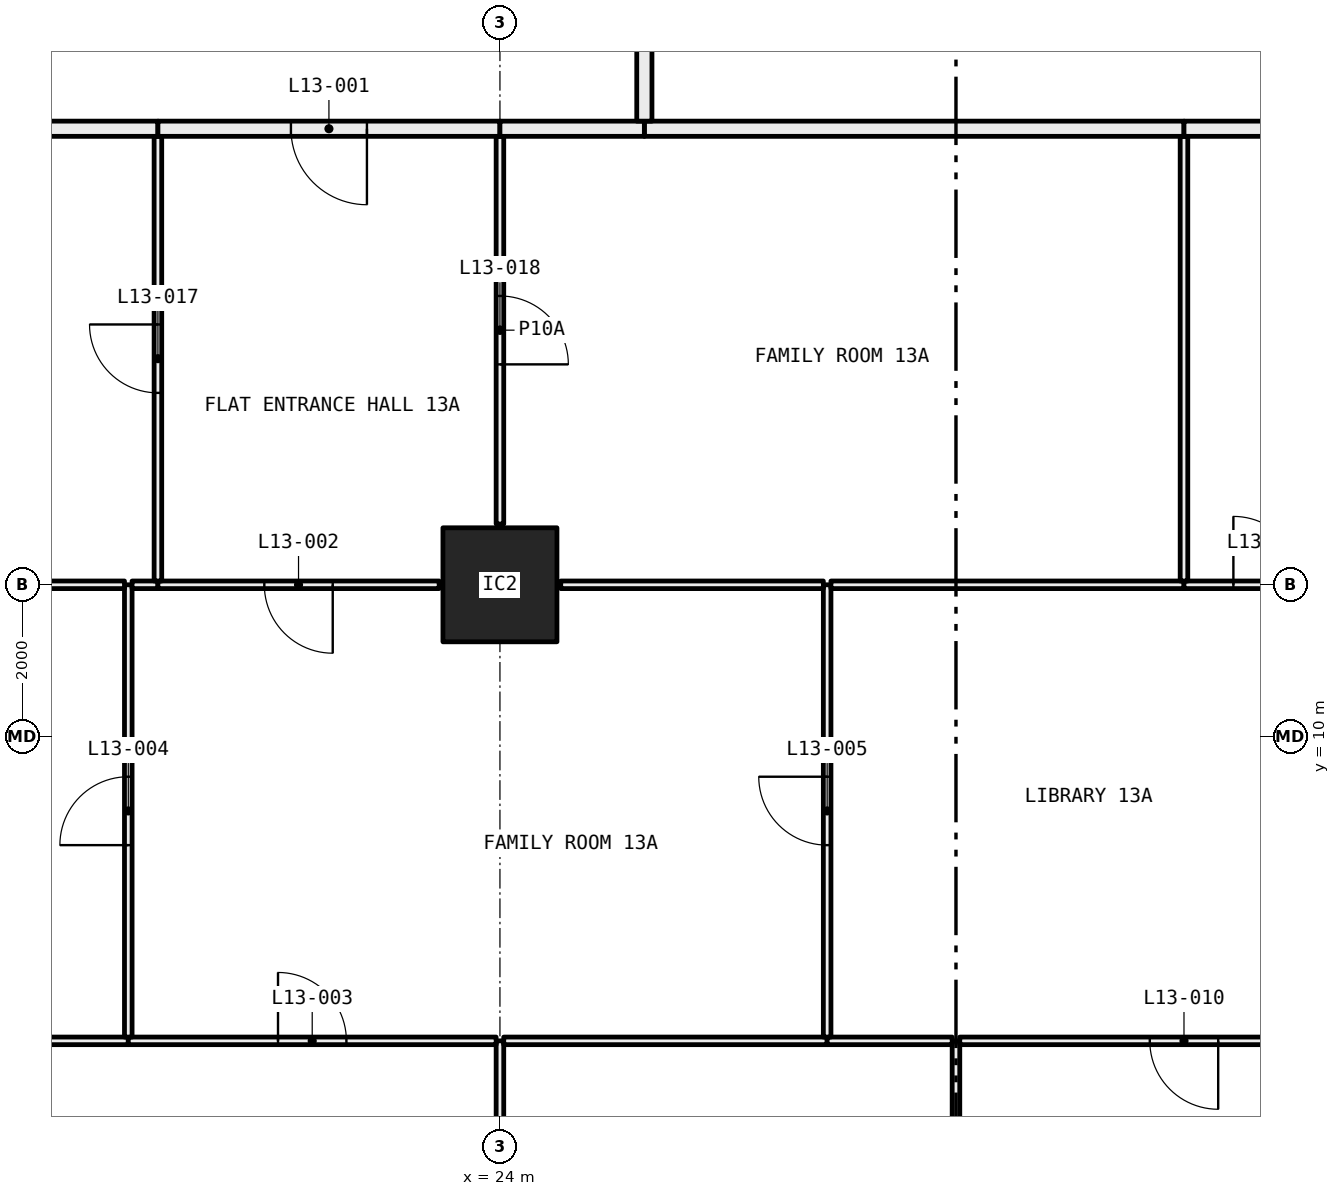
"""IFC4 building model, lengths in metres.
Left out: names, types, materials, properties, quantities, classifications, styles, units other than length and angle.
Written with IfcOpenShell. Run it as: python <this file> out.ifc"""

import sys

from ifc_helpers import new_model, si_unit, direction, frame, frame_2d, origin, origin_2d, place, context, subcontext, project, spatial, rectangle, hollow_rectangle, extrude, element, fill, save


model = new_model("IFC4")
c1 = context("Model", 3, precision=1e-05, world=origin(), true_north=direction((0.0, 1.0)))
c2 = subcontext(c1, "Body", "Model", "MODEL_VIEW")
j1 = project(units=[si_unit("LENGTHUNIT", "METRE"), si_unit("PLANEANGLEUNIT", "RADIAN")], contexts=[c1])
p1 = place(None, origin())
s1 = spatial("IfcSite", under=j1, at=p1, CompositionType="ELEMENT")
p2 = place(p1, origin())
s2 = spatial("IfcBuilding", under=s1, at=p2, CompositionType="ELEMENT")
p3 = place(p2, frame((0.0, 0.0, 57.6)))
s3 = spatial("IfcBuildingStorey", under=s2, at=p3, CompositionType="ELEMENT", Elevation=57.6)
p4 = place(p3, frame((24.0, 12.0, 0.0), z_axis=(0.0, 0.0, 1.0), x_axis=(1.0, 0.0, 0.0)))
e1 = element("IfcColumn", 1, at=p4, inside=s3, PredefinedType="COLUMN", context=c2, shape_type="SweptSolid", body=[
    extrude(hollow_rectangle(XDim=1.5, YDim=1.5, WallThickness=0.065, at=origin_2d()), origin(), (0.0, 0.0, 1.0), 3.05),
])
p5 = place(p3, frame((24.0, 0.72, 0.0), z_axis=(0.0, 0.0, 1.0), x_axis=(0.0, 1.0, 0.0)))
e2 = element("IfcWall", 2, at=p5, inside=s3, PredefinedType="PARTITIONING", context=c2, shape_type="SweptSolid", body=[
    extrude(rectangle(XDim=5.28, YDim=0.1, at=frame_2d((2.64, 0.0))), origin(), (0.0, 0.0, 1.0), 2.45),
])
p6 = place(p5, frame((2.19, 0.0, 0.0)))
e3 = element("IfcOpeningElement", 3, at=p6, cuts=e2, PredefinedType="OPENING", context=c2, shape_type="SweptSolid", body=[
    extrude(rectangle(XDim=0.9, YDim=2.1, at=frame_2d((0.45, 1.05))), frame((0.0, 0.06, 0.0), z_axis=(0.0, -1.0, 0.0), x_axis=(1.0, 0.0, 0.0)), (0.0, 0.0, 1.0), 0.12),
])
p7 = place(p3, frame((19.11, 6.0, 0.0), z_axis=(0.0, 0.0, 1.0), x_axis=(-1.0, 0.0, 0.0)))
e4 = element("IfcWall", 4, at=p7, inside=s3, PredefinedType="PARTITIONING", context=c2, shape_type="SweptSolid", body=[
    extrude(rectangle(XDim=7.06, YDim=0.1, at=frame_2d((3.53, 0.0))), origin(), (0.0, 0.0, 1.0), 2.45),
])
p8 = place(p3, frame((23.95, 6.0, 0.0), z_axis=(0.0, 0.0, 1.0), x_axis=(-1.0, 0.0, 0.0)))
e5 = element("IfcWall", 5, at=p8, inside=s3, PredefinedType="PARTITIONING", context=c2, shape_type="SweptSolid", body=[
    extrude(rectangle(XDim=4.84, YDim=0.1, at=frame_2d((2.42, 0.0))), origin(), (0.0, 0.0, 1.0), 2.45),
])
p9 = place(p8, frame((1.97, 0.0, 0.0)))
e6 = element("IfcOpeningElement", 6, at=p9, cuts=e5, PredefinedType="OPENING", context=c2, shape_type="SweptSolid", body=[
    extrude(rectangle(XDim=0.9, YDim=2.1, at=frame_2d((0.45, 1.05))), frame((0.0, 0.06, 0.0), z_axis=(0.0, -1.0, 0.0), x_axis=(1.0, 0.0, 0.0)), (0.0, 0.0, 1.0), 0.12),
])
p10 = place(p3, frame((30.0, 0.72, 0.0), z_axis=(0.0, 0.0, 1.0), x_axis=(0.0, 1.0, 0.0)))
e7 = element("IfcWall", 7, at=p10, inside=s3, PredefinedType="PARTITIONING", context=c2, shape_type="SweptSolid", body=[
    extrude(rectangle(XDim=5.28, YDim=0.1, at=frame_2d((2.64, 0.0))), origin(), (0.0, 0.0, 1.0), 3.05),
])
p11 = place(p3, frame((28.305, 6.0, 0.0), z_axis=(0.0, 0.0, 1.0), x_axis=(-1.0, 0.0, 0.0)))
e8 = element("IfcWall", 8, at=p11, inside=s3, PredefinedType="PARTITIONING", context=c2, shape_type="SweptSolid", body=[
    extrude(rectangle(XDim=4.255, YDim=0.1, at=frame_2d((2.127, 0.0))), origin(), (0.0, 0.0, 1.0), 2.45),
])
p12 = place(p3, frame((29.95, 6.0, 0.0), z_axis=(0.0, 0.0, 1.0), x_axis=(-1.0, 0.0, 0.0)))
e9 = element("IfcWall", 9, at=p12, inside=s3, PredefinedType="PARTITIONING", context=c2, shape_type="SweptSolid", body=[
    extrude(rectangle(XDim=1.645, YDim=0.1, at=frame_2d((0.823, 0.0))), origin(), (0.0, 0.0, 1.0), 3.05),
])
p13 = place(p3, frame((35.95, 6.0, 0.0), z_axis=(0.0, 0.0, 1.0), x_axis=(-1.0, 0.0, 0.0)))
e10 = element("IfcWall", 10, at=p13, inside=s3, PredefinedType="PARTITIONING", context=c2, shape_type="SweptSolid", body=[
    extrude(rectangle(XDim=5.9, YDim=0.1, at=frame_2d((2.95, 0.0))), origin(), (0.0, 0.0, 1.0), 2.45),
])
p14 = place(p13, frame((2.5, 0.0, 0.0)))
e11 = element("IfcOpeningElement", 11, at=p14, cuts=e10, PredefinedType="OPENING", context=c2, shape_type="SweptSolid", body=[
    extrude(rectangle(XDim=0.9, YDim=2.1, at=frame_2d((0.45, 1.05))), frame((0.0, 0.06, 0.0), z_axis=(0.0, -1.0, 0.0), x_axis=(1.0, 0.0, 0.0)), (0.0, 0.0, 1.0), 0.12),
])
p15 = place(p3, frame((19.11, 6.05, 0.0), z_axis=(0.0, 0.0, 1.0), x_axis=(0.0, 1.0, 0.0)))
e12 = element("IfcWall", 12, at=p15, inside=s3, PredefinedType="PARTITIONING", context=c2, shape_type="SweptSolid", body=[
    extrude(rectangle(XDim=5.95, YDim=0.1, at=frame_2d((2.975, 0.0))), origin(), (0.0, 0.0, 1.0), 2.45),
])
p16 = place(p15, frame((2.525, 0.0, 0.0)))
e13 = element("IfcOpeningElement", 13, at=p16, cuts=e12, PredefinedType="OPENING", context=c2, shape_type="SweptSolid", body=[
    extrude(rectangle(XDim=0.9, YDim=2.1, at=frame_2d((0.45, 1.05))), frame((0.0, 0.06, 0.0), z_axis=(0.0, -1.0, 0.0), x_axis=(1.0, 0.0, 0.0)), (0.0, 0.0, 1.0), 0.12),
])
p17 = place(p3, frame((19.06, 12.0, 0.0), z_axis=(0.0, 0.0, 1.0), x_axis=(-1.0, 0.0, 0.0)))
e14 = element("IfcWall", 14, at=p17, inside=s3, PredefinedType="PARTITIONING", context=c2, shape_type="SweptSolid", body=[
    extrude(rectangle(XDim=4.621, YDim=0.1, at=frame_2d((2.311, 0.0))), origin(), (0.0, 0.0, 1.0), 2.45),
])
p18 = place(p3, frame((28.305, 6.05, 0.0), z_axis=(0.0, 0.0, 1.0), x_axis=(0.0, 1.0, 0.0)))
e15 = element("IfcWall", 15, at=p18, inside=s3, PredefinedType="PARTITIONING", context=c2, shape_type="SweptSolid", body=[
    extrude(rectangle(XDim=5.95, YDim=0.1, at=frame_2d((2.975, 0.0))), origin(), (0.0, 0.0, 1.0), 2.45),
])
p19 = place(p18, frame((2.525, 0.0, 0.0)))
e16 = element("IfcOpeningElement", 16, at=p19, cuts=e15, PredefinedType="OPENING", context=c2, shape_type="SweptSolid", body=[
    extrude(rectangle(XDim=0.9, YDim=2.1, at=frame_2d((0.45, 1.05))), frame((0.0, 0.06, 0.0), z_axis=(0.0, -1.0, 0.0), x_axis=(1.0, 0.0, 0.0)), (0.0, 0.0, 1.0), 0.12),
])
p20 = place(p3, frame((19.5, 12.0, 0.0), z_axis=(0.0, 0.0, 1.0), x_axis=(-1.0, 0.0, 0.0)))
e17 = element("IfcWall", 17, at=p20, inside=s3, PredefinedType="PARTITIONING", context=c2, shape_type="SweptSolid", body=[
    extrude(rectangle(XDim=0.34, YDim=0.1, at=frame_2d((0.17, 0.0))), origin(), (0.0, 0.0, 1.0), 2.45),
])
p21 = place(p3, frame((23.2, 12.0, 0.0), z_axis=(0.0, 0.0, 1.0), x_axis=(-1.0, 0.0, 0.0)))
e18 = element("IfcWall", 18, at=p21, inside=s3, PredefinedType="PARTITIONING", context=c2, shape_type="SweptSolid", body=[
    extrude(rectangle(XDim=3.7, YDim=0.1, at=frame_2d((1.85, 0.0))), origin(), (0.0, 0.0, 1.0), 2.45),
])
p22 = place(p21, frame((1.4, 0.0, 0.0)))
e19 = element("IfcOpeningElement", 19, at=p22, cuts=e18, PredefinedType="OPENING", context=c2, shape_type="SweptSolid", body=[
    extrude(rectangle(XDim=0.9, YDim=2.1, at=frame_2d((0.45, 1.05))), frame((0.0, 0.06, 0.0), z_axis=(0.0, -1.0, 0.0), x_axis=(1.0, 0.0, 0.0)), (0.0, 0.0, 1.0), 0.12),
])
p23 = place(p3, frame((28.255, 12.0, 0.0), z_axis=(0.0, 0.0, 1.0), x_axis=(-1.0, 0.0, 0.0)))
e20 = element("IfcWall", 20, at=p23, inside=s3, PredefinedType="PARTITIONING", context=c2, shape_type="SweptSolid", body=[
    extrude(rectangle(XDim=3.455, YDim=0.1, at=frame_2d((1.728, 0.0))), origin(), (0.0, 0.0, 1.0), 2.45),
])
p24 = place(p3, frame((33.0, 12.0, 0.0), z_axis=(0.0, 0.0, 1.0), x_axis=(-1.0, 0.0, 0.0)))
e21 = element("IfcWall", 21, at=p24, inside=s3, PredefinedType="PARTITIONING", context=c2, shape_type="SweptSolid", body=[
    extrude(rectangle(XDim=4.645, YDim=0.1, at=frame_2d((2.323, 0.0))), origin(), (0.0, 0.0, 1.0), 2.45),
])
p25 = place(p3, frame((35.2, 12.0, 0.0), z_axis=(0.0, 0.0, 1.0), x_axis=(-1.0, 0.0, 0.0)))
e22 = element("IfcWall", 22, at=p25, inside=s3, PredefinedType="PARTITIONING", context=c2, shape_type="SweptSolid", body=[
    extrude(rectangle(XDim=2.2, YDim=0.1, at=frame_2d((1.1, 0.0))), origin(), (0.0, 0.0, 1.0), 2.45),
])
p26 = place(p25, frame((0.65, 0.0, 0.0)))
e23 = element("IfcOpeningElement", 23, at=p26, cuts=e22, PredefinedType="OPENING", context=c2, shape_type="SweptSolid", body=[
    extrude(rectangle(XDim=0.9, YDim=2.1, at=frame_2d((0.45, 1.05))), frame((0.0, 0.06, 0.0), z_axis=(0.0, -1.0, 0.0), x_axis=(1.0, 0.0, 0.0)), (0.0, 0.0, 1.0), 0.12),
])
p27 = place(p3, frame((19.5, 12.05, 0.0), z_axis=(0.0, 0.0, 1.0), x_axis=(0.0, 1.0, 0.0)))
e24 = element("IfcWall", 24, at=p27, inside=s3, PredefinedType="PARTITIONING", context=c2, shape_type="SweptSolid", body=[
    extrude(rectangle(XDim=5.85, YDim=0.1, at=frame_2d((2.925, 0.0))), origin(), (0.0, 0.0, 1.0), 2.45),
])
p28 = place(p27, frame((2.475, 0.0, 0.0)))
e25 = element("IfcOpeningElement", 25, at=p28, cuts=e24, PredefinedType="OPENING", context=c2, shape_type="SweptSolid", body=[
    extrude(rectangle(XDim=0.9, YDim=2.1, at=frame_2d((0.45, 1.05))), frame((0.0, 0.06, 0.0), z_axis=(0.0, -1.0, 0.0), x_axis=(1.0, 0.0, 0.0)), (0.0, 0.0, 1.0), 0.12),
])
p29 = place(p3, frame((19.5, 18.0, 0.0), z_axis=(0.0, 0.0, 1.0), x_axis=(-1.0, 0.0, 0.0)))
e26 = element("IfcWall", 26, at=p29, inside=s3, PredefinedType="PARTITIONING", context=c2, shape_type="SweptSolid", body=[
    extrude(rectangle(XDim=5.136, YDim=0.2, at=frame_2d((2.568, 0.0))), origin(), (0.0, 0.0, 1.0), 3.05),
])
p30 = place(p3, frame((24.0, 12.8, 0.0), z_axis=(0.0, 0.0, 1.0), x_axis=(0.0, 1.0, 0.0)))
e27 = element("IfcWall", 27, at=p30, inside=s3, PredefinedType="PARTITIONING", context=c2, shape_type="SweptSolid", body=[
    extrude(rectangle(XDim=5.1, YDim=0.1, at=frame_2d((2.55, 0.0))), origin(), (0.0, 0.0, 1.0), 3.05),
])
p31 = place(p30, frame((2.1, 0.0, 0.0)))
e28 = element("IfcOpeningElement", 28, at=p31, cuts=e27, PredefinedType="OPENING", context=c2, shape_type="SweptSolid", body=[
    extrude(rectangle(XDim=0.9, YDim=2.1, at=frame_2d((0.45, 1.05))), frame((0.0, 0.06, 0.0), z_axis=(0.0, -1.0, 0.0), x_axis=(1.0, 0.0, 0.0)), (0.0, 0.0, 1.0), 0.12),
])
p32 = place(p3, frame((24.0, 18.0, 0.0), z_axis=(0.0, 0.0, 1.0), x_axis=(-1.0, 0.0, 0.0)))
e29 = element("IfcWall", 29, at=p32, inside=s3, PredefinedType="PARTITIONING", context=c2, shape_type="SweptSolid", body=[
    extrude(rectangle(XDim=4.5, YDim=0.2, at=frame_2d((2.25, 0.0))), origin(), (0.0, 0.0, 1.0), 3.05),
])
p33 = place(p32, frame((1.75, 0.0, 0.0)))
e30 = element("IfcOpeningElement", 30, at=p33, cuts=e29, PredefinedType="OPENING", context=c2, shape_type="SweptSolid", body=[
    extrude(rectangle(XDim=1.0, YDim=2.1, at=frame_2d((0.5, 1.05))), frame((0.0, 0.11, 0.0), z_axis=(0.0, -1.0, 0.0), x_axis=(1.0, 0.0, 0.0)), (0.0, 0.0, 1.0), 0.22),
])
p34 = place(p3, frame((33.0, 12.05, 0.0), z_axis=(0.0, 0.0, 1.0), x_axis=(0.0, 1.0, 0.0)))
e31 = element("IfcWall", 31, at=p34, inside=s3, PredefinedType="PARTITIONING", context=c2, shape_type="SweptSolid", body=[
    extrude(rectangle(XDim=5.85, YDim=0.1, at=frame_2d((2.925, 0.0))), origin(), (0.0, 0.0, 1.0), 2.45),
])
p35 = place(p3, frame((33.0, 18.0, 0.0), z_axis=(0.0, 0.0, 1.0), x_axis=(-1.0, 0.0, 0.0)))
e32 = element("IfcWall", 32, at=p35, inside=s3, PredefinedType="PARTITIONING", context=c2, shape_type="SweptSolid", body=[
    extrude(rectangle(XDim=7.1, YDim=0.2, at=frame_2d((3.55, 0.0))), origin(), (0.0, 0.0, 1.0), 3.05),
])
p36 = place(p3, frame((25.9, 18.0, 0.0), z_axis=(0.0, 0.0, 1.0), x_axis=(-1.0, 0.0, 0.0)))
e33 = element("IfcWall", 33, at=p36, inside=s3, PredefinedType="PARTITIONING", context=c2, shape_type="SweptSolid", body=[
    extrude(rectangle(XDim=1.9, YDim=0.2, at=frame_2d((0.95, 0.0))), origin(), (0.0, 0.0, 1.0), 3.05),
])
p37 = place(p3, frame((36.0, 18.0, 0.0), z_axis=(0.0, 0.0, 1.0), x_axis=(-1.0, 0.0, 0.0)))
e34 = element("IfcWall", 34, at=p37, inside=s3, PredefinedType="PARTITIONING", context=c2, shape_type="SweptSolid", body=[
    extrude(rectangle(XDim=3.0, YDim=0.2, at=frame_2d((1.5, 0.0))), origin(), (0.0, 0.0, 1.0), 2.45),
])
p38 = place(p3, frame((25.9, 23.9, 0.0), z_axis=(0.0, 0.0, 1.0), x_axis=(0.0, -1.0, 0.0)))
e35 = element("IfcWall", 35, at=p38, inside=s3, PredefinedType="PARTITIONING", context=c2, shape_type="SweptSolid", body=[
    extrude(rectangle(XDim=5.8, YDim=0.2, at=frame_2d((2.9, 0.0))), origin(), (0.0, 0.0, 1.0), 3.05),
])
p39 = place(p33, origin())
e36 = element("IfcDoor", 36, at=p39, inside=s3, OperationType="SINGLE_SWING_RIGHT", PredefinedType="DOOR", context=c2, shape_type="SweptSolid", body=[
    extrude(rectangle(XDim=1.0, YDim=2.1, at=frame_2d((0.5, 1.05))), frame((0.0, 0.025, 0.0), z_axis=(0.0, -1.0, 0.0), x_axis=(1.0, 0.0, 0.0)), (0.0, 0.0, 1.0), 0.05),
])
fill(e30, e36)
p40 = place(p22, origin())
e37 = element("IfcDoor", 37, at=p40, inside=s3, OperationType="SINGLE_SWING_RIGHT", PredefinedType="DOOR", context=c2, shape_type="SweptSolid", body=[
    extrude(rectangle(XDim=0.9, YDim=2.1, at=frame_2d((0.45, 1.05))), frame((0.0, 0.025, 0.0), z_axis=(0.0, -1.0, 0.0), x_axis=(1.0, 0.0, 0.0)), (0.0, 0.0, 1.0), 0.05),
])
fill(e19, e37)
p41 = place(p9, frame((0.9, 0.0, 0.0), x_axis=(-1.0, 0.0, 0.0)))
e38 = element("IfcDoor", 38, at=p41, inside=s3, OperationType="SINGLE_SWING_RIGHT", PredefinedType="DOOR", context=c2, shape_type="SweptSolid", body=[
    extrude(rectangle(XDim=0.9, YDim=2.1, at=frame_2d((0.45, 1.05))), frame((0.0, 0.025, 0.0), z_axis=(0.0, -1.0, 0.0), x_axis=(1.0, 0.0, 0.0)), (0.0, 0.0, 1.0), 0.05),
])
fill(e6, e38)
p42 = place(p16, origin())
e39 = element("IfcDoor", 39, at=p42, inside=s3, OperationType="SINGLE_SWING_RIGHT", PredefinedType="DOOR", context=c2, shape_type="SweptSolid", body=[
    extrude(rectangle(XDim=0.9, YDim=2.1, at=frame_2d((0.45, 1.05))), frame((0.0, 0.025, 0.0), z_axis=(0.0, -1.0, 0.0), x_axis=(1.0, 0.0, 0.0)), (0.0, 0.0, 1.0), 0.05),
])
fill(e13, e39)
p43 = place(p19, origin())
e40 = element("IfcDoor", 40, at=p43, inside=s3, OperationType="SINGLE_SWING_LEFT", PredefinedType="DOOR", context=c2, shape_type="SweptSolid", body=[
    extrude(rectangle(XDim=0.9, YDim=2.1, at=frame_2d((0.45, 1.05))), frame((0.0, 0.025, 0.0), z_axis=(0.0, -1.0, 0.0), x_axis=(1.0, 0.0, 0.0)), (0.0, 0.0, 1.0), 0.05),
])
fill(e16, e40)
p44 = place(p14, origin())
e41 = element("IfcDoor", 41, at=p44, inside=s3, OperationType="SINGLE_SWING_RIGHT", PredefinedType="DOOR", context=c2, shape_type="SweptSolid", body=[
    extrude(rectangle(XDim=0.9, YDim=2.1, at=frame_2d((0.45, 1.05))), frame((0.0, 0.025, 0.0), z_axis=(0.0, -1.0, 0.0), x_axis=(1.0, 0.0, 0.0)), (0.0, 0.0, 1.0), 0.05),
])
fill(e11, e41)
p45 = place(p28, origin())
e42 = element("IfcDoor", 42, at=p45, inside=s3, OperationType="SINGLE_SWING_LEFT", PredefinedType="DOOR", context=c2, shape_type="SweptSolid", body=[
    extrude(rectangle(XDim=0.9, YDim=2.1, at=frame_2d((0.45, 1.05))), frame((0.0, 0.025, 0.0), z_axis=(0.0, -1.0, 0.0), x_axis=(1.0, 0.0, 0.0)), (0.0, 0.0, 1.0), 0.05),
])
fill(e25, e42)
p46 = place(p31, frame((0.9, 0.0, 0.0), x_axis=(-1.0, 0.0, 0.0)))
e43 = element("IfcDoor", 43, at=p46, inside=s3, OperationType="SINGLE_SWING_LEFT", PredefinedType="DOOR", context=c2, shape_type="SweptSolid", body=[
    extrude(rectangle(XDim=0.9, YDim=2.1, at=frame_2d((0.45, 1.05))), frame((0.0, 0.025, 0.0), z_axis=(0.0, -1.0, 0.0), x_axis=(1.0, 0.0, 0.0)), (0.0, 0.0, 1.0), 0.05),
])
fill(e28, e43)
p47 = place(p26, frame((0.9, 0.0, 0.0), x_axis=(-1.0, 0.0, 0.0)))
e44 = element("IfcDoor", 44, at=p47, inside=s3, OperationType="SINGLE_SWING_RIGHT", PredefinedType="DOOR", context=c2, shape_type="SweptSolid", body=[
    extrude(rectangle(XDim=0.9, YDim=2.1, at=frame_2d((0.45, 1.05))), frame((0.0, 0.025, 0.0), z_axis=(0.0, -1.0, 0.0), x_axis=(1.0, 0.0, 0.0)), (0.0, 0.0, 1.0), 0.05),
])
fill(e23, e44)
save(model, sys.argv[1])
